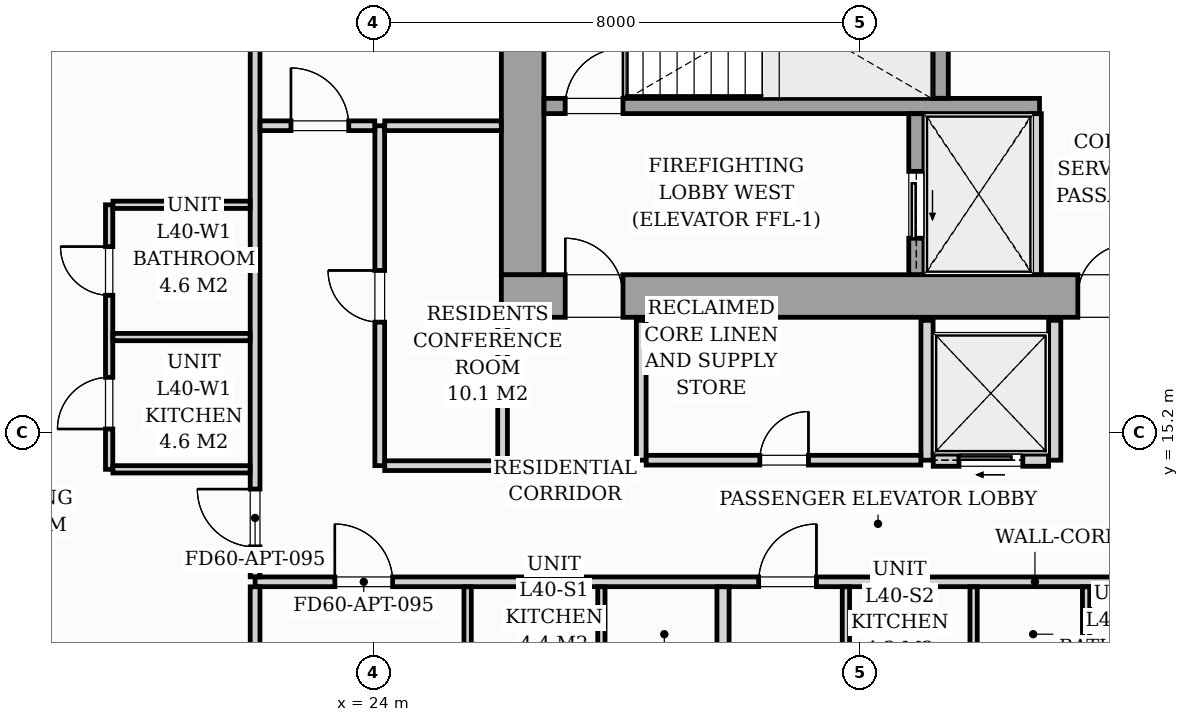
"""IFC4 building model, lengths in metres.
Left out: names, types, materials, properties, quantities, classifications, styles, units other than length and angle.
Written with IfcOpenShell. Run it as: python <this file> out.ifc"""

import sys

from ifc_helpers import new_model, si_unit, direction, frame, frame_2d, origin, origin_2d, place, context, subcontext, project, spatial, rectangle, i_section, extrude, source, transform, mapped, element, fill, save


model = new_model("IFC4")
c1 = context("Model", 3, precision=1e-05, world=origin(), true_north=direction((0.0, 1.0)))
c2 = subcontext(c1, "Body", "Model", "MODEL_VIEW")
j1 = project(units=[si_unit("LENGTHUNIT", "METRE"), si_unit("PLANEANGLEUNIT", "RADIAN")], contexts=[c1])
p1 = place(None, origin())
s1 = spatial("IfcSite", under=j1, at=p1, CompositionType="ELEMENT")
p2 = place(p1, origin())
s2 = spatial("IfcBuilding", under=s1, at=p2, CompositionType="ELEMENT")
p3 = place(p2, frame((0.0, 0.0, 140.6)))
s3 = spatial("IfcBuildingStorey", under=s2, at=p3, CompositionType="ELEMENT", Elevation=140.6)
m1 = source(origin(), c2, "Body", "SweptSolid", [
    extrude(i_section(OverallWidth=0.421, OverallDepth=0.465, WebThickness=0.045, FlangeThickness=0.073, FilletRadius=0.018, at=origin_2d()), origin(), (0.0, 0.0, 1.0), 3.196),
])
for number, where, z_axis, x_axis in (
    (1, (26.4, 17.4, 0.002), (0.0, 0.0, 1.0), (1.0, 0.0, 0.0)),
    (2, (33.12, 17.4, 0.002), (0.0, 0.0, 1.0), (1.0, 0.0, 0.0)),
):
    element("IfcColumn", number, at=place(p3, frame(where, z_axis=z_axis, x_axis=x_axis)), inside=s3, PredefinedType="PILASTER", context=c2, shape_type="MappedRepresentation", body=[
        mapped(m1, transform((0.0, 0.0, 0.0), scale=1.0)),
    ])
p4 = place(p3, frame((26.1, 17.45, 0.0), z_axis=(0.0, 0.0, 1.0), x_axis=(1.0, 0.0, 0.0)))
e3 = element("IfcWall", 3, at=p4, inside=s3, PredefinedType="SHEAR", context=c2, shape_type="SweptSolid", body=[
    extrude(rectangle(XDim=19.8, YDim=0.7, at=frame_2d((9.9, 0.0))), origin(), (0.0, 0.0, 1.0), 3.2),
])
p5 = place(p4, frame((1.05, 0.0, 0.0)))
e4 = element("IfcOpeningElement", 4, at=p5, cuts=e3, PredefinedType="OPENING", context=c2, shape_type="SweptSolid", body=[
    extrude(rectangle(XDim=0.95, YDim=2.06, at=frame_2d((0.475, 1.03))), frame((0.0, 0.36, 0.0), z_axis=(0.0, -1.0, 0.0), x_axis=(1.0, 0.0, 0.0)), (0.0, 0.0, 1.0), 0.72),
])
p6 = place(p4, frame((9.48, 0.0, 0.0)))
e5 = element("IfcOpeningElement", 5, at=p6, cuts=e3, PredefinedType="OPENING", context=c2, shape_type="SweptSolid", body=[
    extrude(rectangle(XDim=0.85, YDim=2.0, at=frame_2d((0.425, 1.0))), frame((0.0, 0.36, 0.0), z_axis=(0.0, -1.0, 0.0), x_axis=(1.0, 0.0, 0.0)), (0.0, 0.0, 1.0), 0.72),
])
p7 = place(p4, frame((17.65, 0.0, 0.0)))
e6 = element("IfcOpeningElement", 6, at=p7, cuts=e3, PredefinedType="OPENING", context=c2, shape_type="SweptSolid", body=[
    extrude(rectangle(XDim=0.95, YDim=2.06, at=frame_2d((0.475, 1.03))), frame((0.0, 0.36, 0.0), z_axis=(0.0, -1.0, 0.0), x_axis=(1.0, 0.0, 0.0)), (0.0, 0.0, 1.0), 0.72),
])
p8 = place(p3, frame((26.45, 17.802, 0.0), z_axis=(0.0, 0.0, 1.0), x_axis=(0.0, 1.0, 0.0)))
e7 = element("IfcWall", 7, at=p8, inside=s3, PredefinedType="SHEAR", context=c2, shape_type="SweptSolid", body=[
    extrude(rectangle(XDim=5.796, YDim=0.7, at=frame_2d((2.898, 0.0))), origin(), (0.0, 0.0, 1.0), 3.2),
])
p9 = place(p3, frame((26.802, 20.575, 0.0), z_axis=(0.0, 0.0, 1.0), x_axis=(1.0, 0.0, 0.0)))
e8 = element("IfcWall", 8, at=p9, inside=s3, PredefinedType="SOLIDWALL", context=c2, shape_type="SweptSolid", body=[
    extrude(rectangle(XDim=8.148, YDim=0.25, at=frame_2d((4.074, 0.0))), origin(), (0.0, 0.0, 1.0), 3.2),
])
p10 = place(p9, frame((0.348, 0.0, 0.0)))
e9 = element("IfcOpeningElement", 9, at=p10, cuts=e8, PredefinedType="OPENING", context=c2, shape_type="SweptSolid", body=[
    extrude(rectangle(XDim=0.95, YDim=2.06, at=frame_2d((0.475, 1.03))), frame((0.0, 0.135, 0.0), z_axis=(0.0, -1.0, 0.0), x_axis=(1.0, 0.0, 0.0)), (0.0, 0.0, 1.0), 0.27),
])
p11 = place(p3, frame((33.325, 20.702, 0.0), z_axis=(0.0, 0.0, 1.0), x_axis=(0.0, 1.0, 0.0)))
e10 = element("IfcWall", 10, at=p11, inside=s3, PredefinedType="SOLIDWALL", context=c2, shape_type="SweptSolid", body=[
    extrude(rectangle(XDim=2.896, YDim=0.25, at=frame_2d((1.448, 0.0))), origin(), (0.0, 0.0, 1.0), 3.2),
])
p12 = place(p3, frame((32.925, 17.802, 0.0), z_axis=(0.0, 0.0, 1.0), x_axis=(0.0, 1.0, 0.0)))
e11 = element("IfcWall", 11, at=p12, inside=s3, PredefinedType="SOLIDWALL", context=c2, shape_type="SweptSolid", body=[
    extrude(rectangle(XDim=2.646, YDim=0.25, at=frame_2d((1.323, 0.0))), origin(), (0.0, 0.0, 1.0), 3.2),
])
p13 = place(p12, frame((0.598, 0.0, 0.0)))
e12 = element("IfcOpeningElement", 12, at=p13, cuts=e11, PredefinedType="OPENING", context=c2, shape_type="SweptSolid", body=[
    extrude(rectangle(XDim=1.1, YDim=2.08, at=frame_2d((0.55, 1.04))), frame((0.0, 0.135, 0.0), z_axis=(0.0, -1.0, 0.0), x_axis=(1.0, 0.0, 0.0)), (0.0, 0.0, 1.0), 0.27),
])
p14 = place(p3, frame((34.9, 17.802, 0.0), z_axis=(0.0, 0.0, 1.0), x_axis=(0.0, 1.0, 0.0)))
e13 = element("IfcWall", 13, at=p14, inside=s3, PredefinedType="PARTITIONING", context=c2, shape_type="SweptSolid", body=[
    extrude(rectangle(XDim=2.646, YDim=0.16, at=frame_2d((1.323, 0.0))), origin(), (0.0, 0.0, 1.0), 2.94),
])
p15 = place(p3, frame((28.4, 14.75, 0.0), z_axis=(0.0, 0.0, 1.0), x_axis=(0.0, 1.0, 0.0)))
e14 = element("IfcWall", 14, at=p15, inside=s3, PredefinedType="PARTITIONING", context=c2, shape_type="SweptSolid", body=[
    extrude(rectangle(XDim=2.3, YDim=0.16, at=frame_2d((1.15, 0.0))), origin(), (0.0, 0.0, 1.0), 2.94),
])
p16 = place(p3, frame((33.1, 14.75, 0.0), z_axis=(0.0, 0.0, 1.0), x_axis=(0.0, 1.0, 0.0)))
e15 = element("IfcWall", 15, at=p16, inside=s3, PredefinedType="PARTITIONING", context=c2, shape_type="SweptSolid", body=[
    extrude(rectangle(XDim=2.3, YDim=0.2, at=frame_2d((1.15, 0.0))), origin(), (0.0, 0.0, 1.0), 2.94),
])
p17 = place(p3, frame((28.482, 14.75, 0.0), z_axis=(0.0, 0.0, 1.0), x_axis=(1.0, 0.0, 0.0)))
e16 = element("IfcWall", 16, at=p17, inside=s3, PredefinedType="PARTITIONING", context=c2, shape_type="SweptSolid", body=[
    extrude(rectangle(XDim=4.516, YDim=0.16, at=frame_2d((2.258, 0.0))), origin(), (0.0, 0.0, 1.0), 2.94),
])
p18 = place(p17, frame((1.868, 0.0, 0.0)))
e17 = element("IfcOpeningElement", 17, at=p18, cuts=e16, PredefinedType="OPENING", context=c2, shape_type="SweptSolid", body=[
    extrude(rectangle(XDim=0.8, YDim=2.05, at=frame_2d((0.4, 1.025))), frame((0.0, 0.09, 0.0), z_axis=(0.0, -1.0, 0.0), x_axis=(1.0, 0.0, 0.0)), (0.0, 0.0, 1.0), 0.18),
])
p19 = place(p3, frame((35.2, 14.75, 0.0), z_axis=(0.0, 0.0, 1.0), x_axis=(0.0, 1.0, 0.0)))
e18 = element("IfcWall", 18, at=p19, inside=s3, PredefinedType="PARTITIONING", context=c2, shape_type="SweptSolid", body=[
    extrude(rectangle(XDim=2.3, YDim=0.2, at=frame_2d((1.15, 0.0))), origin(), (0.0, 0.0, 1.0), 2.94),
])
p20 = place(p3, frame((33.202, 14.75, 0.0), z_axis=(0.0, 0.0, 1.0), x_axis=(1.0, 0.0, 0.0)))
e19 = element("IfcWall", 19, at=p20, inside=s3, PredefinedType="PARTITIONING", context=c2, shape_type="SweptSolid", body=[
    extrude(rectangle(XDim=1.896, YDim=0.2, at=frame_2d((0.948, 0.0))), origin(), (0.0, 0.0, 1.0), 2.94),
])
p21 = place(p20, frame((0.423, 0.0, 0.0)))
e20 = element("IfcOpeningElement", 20, at=p21, cuts=e19, PredefinedType="OPENING", context=c2, shape_type="SweptSolid", body=[
    extrude(rectangle(XDim=1.05, YDim=2.08, at=frame_2d((0.525, 1.04))), frame((0.0, 0.11, 0.0), z_axis=(0.0, -1.0, 0.0), x_axis=(1.0, 0.0, 0.0)), (0.0, 0.0, 1.0), 0.22),
])
p22 = place(p3, frame((22.05, 12.75, 0.0), z_axis=(0.0, 0.0, 1.0), x_axis=(1.0, 0.0, 0.0)))
e21 = element("IfcWall", 21, at=p22, inside=s3, PredefinedType="PARTITIONING", context=c2, shape_type="SweptSolid", body=[
    extrude(rectangle(XDim=25.65, YDim=0.16, at=frame_2d((12.825, 0.0))), origin(), (0.0, 0.0, 1.0), 2.94),
])
p23 = place(p22, frame((1.312, 0.0, 0.0)))
e22 = element("IfcOpeningElement", 22, at=p23, cuts=e21, PredefinedType="OPENING", context=c2, shape_type="SweptSolid", body=[
    extrude(rectangle(XDim=0.95, YDim=2.06, at=frame_2d((0.475, 1.03))), frame((0.0, 0.09, 0.0), z_axis=(0.0, -1.0, 0.0), x_axis=(1.0, 0.0, 0.0)), (0.0, 0.0, 1.0), 0.18),
])
p24 = place(p22, frame((8.281, 0.0, 0.0)))
e23 = element("IfcOpeningElement", 23, at=p24, cuts=e21, PredefinedType="OPENING", context=c2, shape_type="SweptSolid", body=[
    extrude(rectangle(XDim=0.95, YDim=2.06, at=frame_2d((0.475, 1.03))), frame((0.0, 0.09, 0.0), z_axis=(0.0, -1.0, 0.0), x_axis=(1.0, 0.0, 0.0)), (0.0, 0.0, 1.0), 0.18),
])
p25 = place(p22, frame((17.268, 0.0, 0.0)))
e24 = element("IfcOpeningElement", 24, at=p25, cuts=e21, PredefinedType="OPENING", context=c2, shape_type="SweptSolid", body=[
    extrude(rectangle(XDim=0.95, YDim=2.06, at=frame_2d((0.475, 1.03))), frame((0.0, 0.09, 0.0), z_axis=(0.0, -1.0, 0.0), x_axis=(1.0, 0.0, 0.0)), (0.0, 0.0, 1.0), 0.18),
])
p26 = place(p3, frame((22.05, 8.253, 0.0), z_axis=(0.0, 0.0, 1.0), x_axis=(0.0, 1.0, 0.0)))
e25 = element("IfcWall", 25, at=p26, inside=s3, PredefinedType="PARTITIONING", context=c2, shape_type="SweptSolid", body=[
    extrude(rectangle(XDim=4.415, YDim=0.16, at=frame_2d((2.208, 0.0))), origin(), (0.0, 0.0, 1.0), 2.94),
])
p27 = place(p3, frame((22.05, 12.832, 0.0), z_axis=(0.0, 0.0, 1.0), x_axis=(0.0, 1.0, 0.0)))
e26 = element("IfcWall", 26, at=p27, inside=s3, PredefinedType="PARTITIONING", context=c2, shape_type="SweptSolid", body=[
    extrude(rectangle(XDim=14.585, YDim=0.16, at=frame_2d((7.292, 0.0))), origin(), (0.0, 0.0, 1.0), 2.94),
])
p28 = place(p27, frame((0.493, 0.0, 0.0)))
e27 = element("IfcOpeningElement", 27, at=p28, cuts=e26, PredefinedType="OPENING", context=c2, shape_type="SweptSolid", body=[
    extrude(rectangle(XDim=0.95, YDim=2.06, at=frame_2d((0.475, 1.03))), frame((0.0, 0.09, 0.0), z_axis=(0.0, -1.0, 0.0), x_axis=(1.0, 0.0, 0.0)), (0.0, 0.0, 1.0), 0.18),
])
for number, where, z_axis, x_axis in (
    (28, (25.545, 10.562, 0.0), (0.0, 0.0, 1.0), (0.0, 1.0, 0.0)),
    (29, (27.745, 10.562, 0.0), (0.0, 0.0, 1.0), (0.0, 1.0, 0.0)),
):
    element("IfcWall", number, at=place(p3, frame(where, z_axis=z_axis, x_axis=x_axis)), inside=s3, PredefinedType="PARTITIONING", context=c2, shape_type="SweptSolid", body=[
        extrude(rectangle(XDim=2.106, YDim=0.12, at=frame_2d((1.053, 0.0))), origin(), (0.0, 0.0, 1.0), 2.94),
    ])
p29 = place(p3, frame((29.745, 10.562, 0.0), z_axis=(0.0, 0.0, 1.0), x_axis=(0.0, 1.0, 0.0)))
e30 = element("IfcWall", 30, at=p29, inside=s3, PredefinedType="PARTITIONING", context=c2, shape_type="SweptSolid", body=[
    extrude(rectangle(XDim=2.106, YDim=0.2, at=frame_2d((1.053, 0.0))), origin(), (0.0, 0.0, 1.0), 2.94),
])
p30 = place(p3, frame((35.716, 6.754, 0.0), z_axis=(0.0, 0.0, 1.0), x_axis=(0.0, 1.0, 0.0)))
e31 = element("IfcWall", 31, at=p30, inside=s3, PredefinedType="PARTITIONING", context=c2, shape_type="SweptSolid", body=[
    extrude(rectangle(XDim=5.914, YDim=0.12, at=frame_2d((2.957, 0.0))), origin(), (0.0, 0.0, 1.0), 2.94),
])
p31 = place(p30, frame((2.646, 0.0, 0.0)))
e32 = element("IfcOpeningElement", 32, at=p31, cuts=e31, PredefinedType="OPENING", context=c2, shape_type="SweptSolid", body=[
    extrude(rectangle(XDim=0.9, YDim=2.05, at=frame_2d((0.45, 1.025))), frame((0.0, 0.07, 0.0), z_axis=(0.0, -1.0, 0.0), x_axis=(1.0, 0.0, 0.0)), (0.0, 0.0, 1.0), 0.14),
])
for number, where, z_axis, x_axis in (
    (33, (33.866, 10.562, 0.0), (0.0, 0.0, 1.0), (0.0, 1.0, 0.0)),
    (34, (31.766, 10.562, 0.0), (0.0, 0.0, 1.0), (0.0, 1.0, 0.0)),
):
    element("IfcWall", number, at=place(p3, frame(where, z_axis=z_axis, x_axis=x_axis)), inside=s3, PredefinedType="PARTITIONING", context=c2, shape_type="SweptSolid", body=[
        extrude(rectangle(XDim=2.106, YDim=0.12, at=frame_2d((1.053, 0.0))), origin(), (0.0, 0.0, 1.0), 2.94),
    ])
p32 = place(p3, frame((19.65, 14.6, 0.0), z_axis=(0.0, 0.0, 1.0), x_axis=(0.0, 1.0, 0.0)))
e35 = element("IfcWall", 35, at=p32, inside=s3, PredefinedType="PARTITIONING", context=c2, shape_type="SweptSolid", body=[
    extrude(rectangle(XDim=4.35, YDim=0.12, at=frame_2d((2.175, 0.0))), origin(), (0.0, 0.0, 1.0), 2.94),
])
p33 = place(p32, frame((0.663, 0.0, 0.0)))
e36 = element("IfcOpeningElement", 36, at=p33, cuts=e35, PredefinedType="OPENING", context=c2, shape_type="SweptSolid", body=[
    extrude(rectangle(XDim=0.85, YDim=2.05, at=frame_2d((0.425, 1.025))), frame((0.0, 0.07, 0.0), z_axis=(0.0, -1.0, 0.0), x_axis=(1.0, 0.0, 0.0)), (0.0, 0.0, 1.0), 0.14),
])
p34 = place(p32, frame((2.862, 0.0, 0.0)))
e37 = element("IfcOpeningElement", 37, at=p34, cuts=e35, PredefinedType="OPENING", context=c2, shape_type="SweptSolid", body=[
    extrude(rectangle(XDim=0.8, YDim=2.02, at=frame_2d((0.4, 1.01))), frame((0.0, 0.07, 0.0), z_axis=(0.0, -1.0, 0.0), x_axis=(1.0, 0.0, 0.0)), (0.0, 0.0, 1.0), 0.14),
])
for number, where, z_axis, x_axis in (
    (38, (19.712, 16.775, 0.0), (0.0, 0.0, 1.0), (1.0, 0.0, 0.0)),
    (39, (19.712, 14.6, 0.0), (0.0, 0.0, 1.0), (1.0, 0.0, 0.0)),
    (40, (19.712, 18.95, 0.0), (0.0, 0.0, 1.0), (1.0, 0.0, 0.0)),
):
    element("IfcWall", number, at=place(p3, frame(where, z_axis=z_axis, x_axis=x_axis)), inside=s3, PredefinedType="PARTITIONING", context=c2, shape_type="SweptSolid", body=[
        extrude(rectangle(XDim=2.256, YDim=0.12, at=frame_2d((1.128, 0.0))), origin(), (0.0, 0.0, 1.0), 2.94),
    ])
p35 = place(p3, frame((24.1, 14.66, 0.0), z_axis=(0.0, 0.0, 1.0), x_axis=(0.0, 1.0, 0.0)))
e41 = element("IfcWall", 41, at=p35, inside=s3, PredefinedType="PARTITIONING", context=c2, shape_type="SweptSolid", body=[
    extrude(rectangle(XDim=5.59, YDim=0.16, at=frame_2d((2.795, 0.0))), origin(), (0.0, 0.0, 1.0), 2.94),
])
p36 = place(p35, frame((2.36, 0.0, 0.0)))
e42 = element("IfcOpeningElement", 42, at=p36, cuts=e41, PredefinedType="OPENING", context=c2, shape_type="SweptSolid", body=[
    extrude(rectangle(XDim=0.85, YDim=2.0, at=frame_2d((0.425, 1.0))), frame((0.0, 0.09, 0.0), z_axis=(0.0, -1.0, 0.0), x_axis=(1.0, 0.0, 0.0)), (0.0, 0.0, 1.0), 0.18),
])
p37 = place(p3, frame((22.132, 20.25, 0.0), z_axis=(0.0, 0.0, 1.0), x_axis=(1.0, 0.0, 0.0)))
e43 = element("IfcWall", 43, at=p37, inside=s3, PredefinedType="PARTITIONING", context=c2, shape_type="SweptSolid", body=[
    extrude(rectangle(XDim=1.886, YDim=0.16, at=frame_2d((0.943, 0.0))), origin(), (0.0, 0.0, 1.0), 2.94),
])
p38 = place(p37, frame((0.508, 0.0, 0.0)))
e44 = element("IfcOpeningElement", 44, at=p38, cuts=e43, PredefinedType="OPENING", context=c2, shape_type="SweptSolid", body=[
    extrude(rectangle(XDim=0.95, YDim=2.06, at=frame_2d((0.475, 1.03))), frame((0.0, 0.09, 0.0), z_axis=(0.0, -1.0, 0.0), x_axis=(1.0, 0.0, 0.0)), (0.0, 0.0, 1.0), 0.18),
])
p39 = place(p3, frame((24.182, 20.25, 0.0), z_axis=(0.0, 0.0, 1.0), x_axis=(1.0, 0.0, 0.0)))
e45 = element("IfcWall", 45, at=p39, inside=s3, PredefinedType="PARTITIONING", context=c2, shape_type="SweptSolid", body=[
    extrude(rectangle(XDim=1.916, YDim=0.16, at=frame_2d((0.958, 0.0))), origin(), (0.0, 0.0, 1.0), 2.94),
])
p40 = place(p3, frame((26.12, 14.66, 0.0), z_axis=(0.0, 0.0, 1.0), x_axis=(0.0, 1.0, 0.0)))
e46 = element("IfcWall", 46, at=p40, inside=s3, PredefinedType="PARTITIONING", context=c2, shape_type="SweptSolid", body=[
    extrude(rectangle(XDim=2.438, YDim=0.16, at=frame_2d((1.219, 0.0))), origin(), (0.0, 0.0, 1.0), 2.94),
])
p41 = place(p3, frame((24.182, 14.66, 0.0), z_axis=(0.0, 0.0, 1.0), x_axis=(1.0, 0.0, 0.0)))
e47 = element("IfcWall", 47, at=p41, inside=s3, PredefinedType="PARTITIONING", context=c2, shape_type="SweptSolid", body=[
    extrude(rectangle(XDim=1.856, YDim=0.16, at=frame_2d((0.928, 0.0))), origin(), (0.0, 0.0, 1.0), 2.94),
])
m2 = source(origin(), c2, "Body", "SweptSolid", [
    extrude(rectangle(XDim=0.95, YDim=2.06, at=frame_2d((0.475, 1.03))), frame((0.0, 0.025, 0.0), z_axis=(0.0, -1.0, 0.0), x_axis=(1.0, 0.0, 0.0)), (0.0, 0.0, 1.0), 0.05),
])
p42 = place(p5, origin())
e48 = element("IfcDoor", 48, at=p42, inside=s3, OperationType="SINGLE_SWING_LEFT", PredefinedType="DOOR", context=c2, shape_type="MappedRepresentation", body=[
    mapped(m2, transform((0.0, 0.0, 0.0), scale=1.0)),
])
fill(e4, e48)
m3 = source(origin(), c2, "Body", "SweptSolid", [
    extrude(rectangle(XDim=0.85, YDim=2.0, at=frame_2d((0.425, 1.0))), frame((0.0, 0.025, 0.0), z_axis=(0.0, -1.0, 0.0), x_axis=(1.0, 0.0, 0.0)), (0.0, 0.0, 1.0), 0.05),
])
p43 = place(p6, origin())
e49 = element("IfcDoor", 49, at=p43, inside=s3, OperationType="SINGLE_SWING_RIGHT", PredefinedType="DOOR", context=c2, shape_type="MappedRepresentation", body=[
    mapped(m3, transform((0.0, 0.0, 0.0), scale=1.0)),
])
fill(e5, e49)
p44 = place(p10, origin())
e50 = element("IfcDoor", 50, at=p44, inside=s3, OperationType="SINGLE_SWING_RIGHT", PredefinedType="DOOR", context=c2, shape_type="MappedRepresentation", body=[
    mapped(m2, transform((0.0, 0.0, 0.0), scale=1.0)),
])
fill(e9, e50)
m4 = source(origin(), c2, "Body", "SweptSolid", [
    extrude(rectangle(XDim=1.1, YDim=2.08, at=frame_2d((0.55, 1.04))), frame((0.0, 0.025, 0.0), z_axis=(0.0, -1.0, 0.0), x_axis=(1.0, 0.0, 0.0)), (0.0, 0.0, 1.0), 0.05),
])
p45 = place(p13, origin())
e51 = element("IfcDoor", 51, at=p45, inside=s3, OperationType="SLIDING_TO_LEFT", PredefinedType="DOOR", context=c2, shape_type="MappedRepresentation", body=[
    mapped(m4, transform((0.0, 0.0, 0.0), scale=1.0)),
])
fill(e12, e51)
m5 = source(origin(), c2, "Body", "SweptSolid", [
    extrude(rectangle(XDim=0.8, YDim=2.05, at=frame_2d((0.4, 1.025))), frame((0.0, 0.025, 0.0), z_axis=(0.0, -1.0, 0.0), x_axis=(1.0, 0.0, 0.0)), (0.0, 0.0, 1.0), 0.05),
])
p46 = place(p18, origin())
e52 = element("IfcDoor", 52, at=p46, inside=s3, OperationType="SINGLE_SWING_RIGHT", PredefinedType="DOOR", context=c2, shape_type="MappedRepresentation", body=[
    mapped(m5, transform((0.0, 0.0, 0.0), scale=1.0)),
])
fill(e17, e52)
m6 = source(origin(), c2, "Body", "SweptSolid", [
    extrude(rectangle(XDim=1.05, YDim=2.08, at=frame_2d((0.525, 1.04))), frame((0.0, 0.025, 0.0), z_axis=(0.0, -1.0, 0.0), x_axis=(1.0, 0.0, 0.0)), (0.0, 0.0, 1.0), 0.05),
])
p47 = place(p21, origin())
e53 = element("IfcDoor", 53, at=p47, inside=s3, OperationType="SLIDING_TO_LEFT", PredefinedType="DOOR", context=c2, shape_type="MappedRepresentation", body=[
    mapped(m6, transform((0.0, 0.0, 0.0), scale=1.0)),
])
fill(e20, e53)
m7 = source(origin(), c2, "Body", "SweptSolid", [
    extrude(rectangle(XDim=0.95, YDim=2.06, at=frame_2d((0.475, 1.03))), frame((0.0, 0.025, 0.0), z_axis=(0.0, -1.0, 0.0), x_axis=(1.0, 0.0, 0.0)), (0.0, 0.0, 1.0), 0.05),
])
p48 = place(p23, origin())
e54 = element("IfcDoor", 54, at=p48, inside=s3, OperationType="SINGLE_SWING_LEFT", PredefinedType="DOOR", context=c2, shape_type="MappedRepresentation", body=[
    mapped(m7, transform((0.0, 0.0, 0.0), scale=1.0)),
])
fill(e22, e54)
p49 = place(p24, origin())
e55 = element("IfcDoor", 55, at=p49, inside=s3, OperationType="SINGLE_SWING_RIGHT", PredefinedType="DOOR", context=c2, shape_type="MappedRepresentation", body=[
    mapped(m7, transform((0.0, 0.0, 0.0), scale=1.0)),
])
fill(e23, e55)
p50 = place(p28, origin())
e56 = element("IfcDoor", 56, at=p50, inside=s3, OperationType="SINGLE_SWING_RIGHT", PredefinedType="DOOR", context=c2, shape_type="MappedRepresentation", body=[
    mapped(m7, transform((0.0, 0.0, 0.0), scale=1.0)),
])
fill(e27, e56)
m8 = source(origin(), c2, "Body", "SweptSolid", [
    extrude(rectangle(XDim=0.85, YDim=2.05, at=frame_2d((0.425, 1.025))), frame((0.0, 0.025, 0.0), z_axis=(0.0, -1.0, 0.0), x_axis=(1.0, 0.0, 0.0)), (0.0, 0.0, 1.0), 0.05),
])
p51 = place(p33, origin())
e57 = element("IfcDoor", 57, at=p51, inside=s3, OperationType="SINGLE_SWING_LEFT", PredefinedType="DOOR", context=c2, shape_type="MappedRepresentation", body=[
    mapped(m8, transform((0.0, 0.0, 0.0), scale=1.0)),
])
fill(e36, e57)
m9 = source(origin(), c2, "Body", "SweptSolid", [
    extrude(rectangle(XDim=0.8, YDim=2.02, at=frame_2d((0.4, 1.01))), frame((0.0, 0.025, 0.0), z_axis=(0.0, -1.0, 0.0), x_axis=(1.0, 0.0, 0.0)), (0.0, 0.0, 1.0), 0.05),
])
p52 = place(p34, origin())
e58 = element("IfcDoor", 58, at=p52, inside=s3, OperationType="SINGLE_SWING_RIGHT", PredefinedType="DOOR", context=c2, shape_type="MappedRepresentation", body=[
    mapped(m9, transform((0.0, 0.0, 0.0), scale=1.0)),
])
fill(e37, e58)
p53 = place(p36, origin())
e59 = element("IfcDoor", 59, at=p53, inside=s3, OperationType="SINGLE_SWING_RIGHT", PredefinedType="DOOR", context=c2, shape_type="MappedRepresentation", body=[
    mapped(m3, transform((0.0, 0.0, 0.0), scale=1.0)),
])
fill(e42, e59)
p54 = place(p38, origin())
e60 = element("IfcDoor", 60, at=p54, inside=s3, OperationType="SINGLE_SWING_LEFT", PredefinedType="DOOR", context=c2, shape_type="MappedRepresentation", body=[
    mapped(m7, transform((0.0, 0.0, 0.0), scale=1.0)),
])
fill(e44, e60)
save(model, sys.argv[1])
